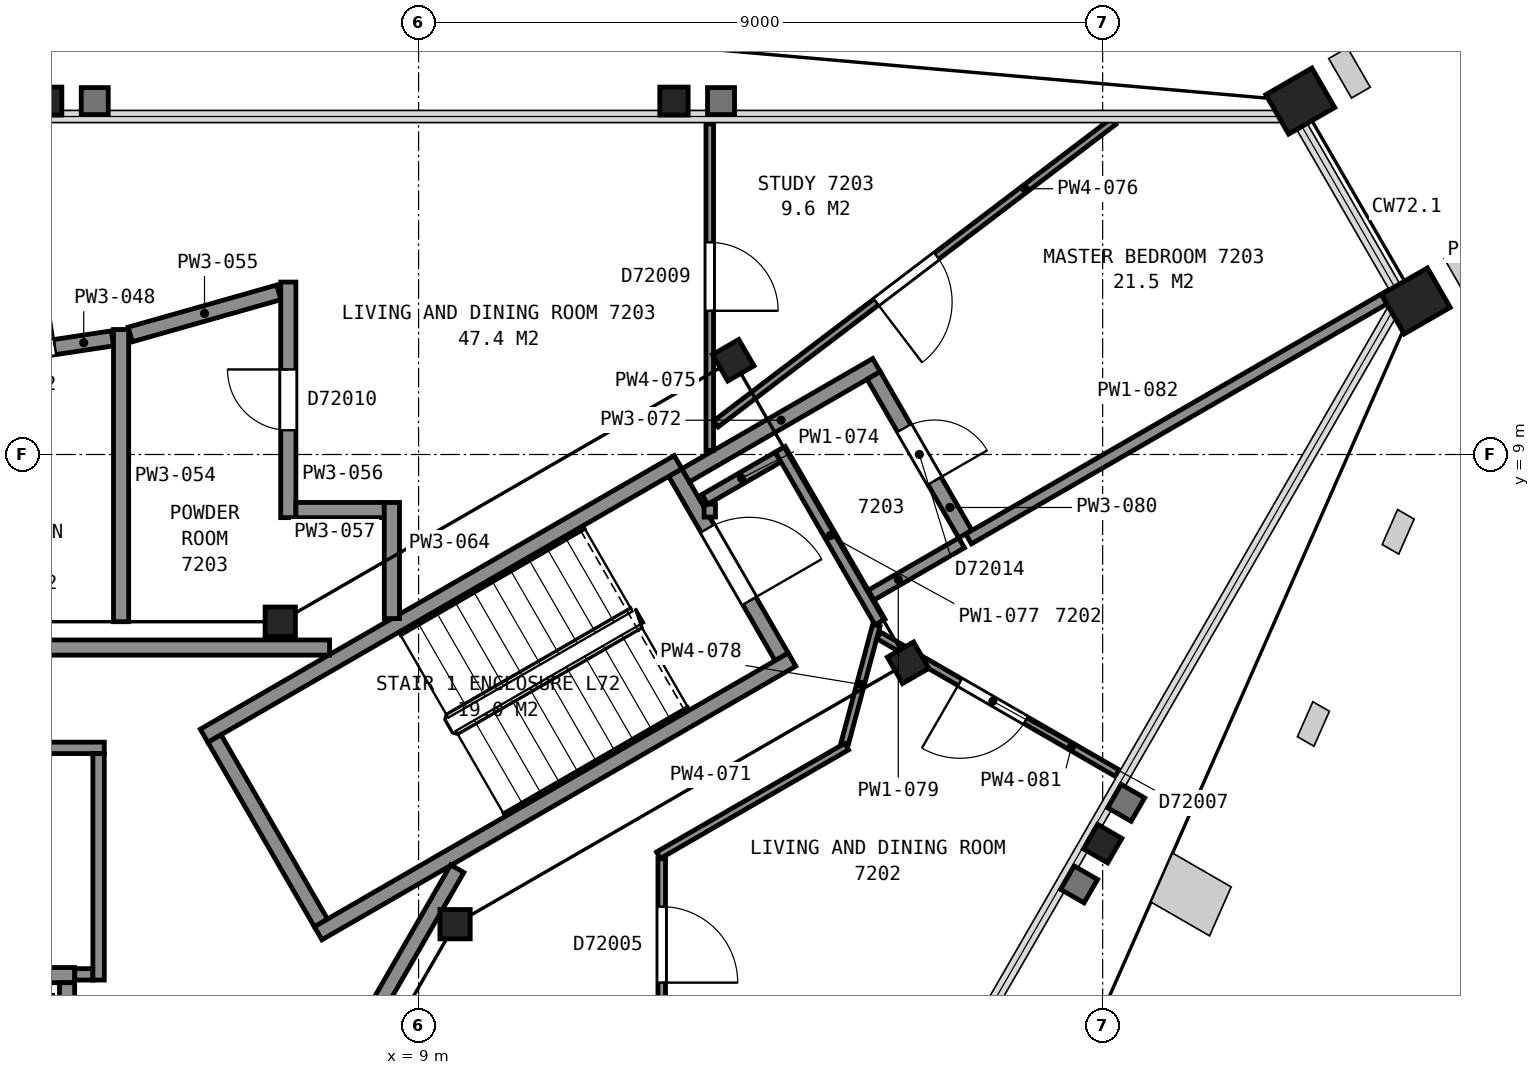
"""IFC4 building model, lengths in metres.
Left out: names, types, materials, properties, quantities, classifications, styles, units other than length and angle.
Written with IfcOpenShell. Run it as: python <this file> out.ifc"""

import sys

from ifc_helpers import new_model, si_unit, direction, frame, frame_2d, origin, origin_2d, place, context, subcontext, project, spatial, rectangle, hollow_rectangle, i_section, extrude, element, fill, save


model = new_model("IFC4")
c1 = context("Model", 3, precision=1e-05, world=origin(), true_north=direction((0.0, 1.0)))
c2 = subcontext(c1, "Body", "Model", "MODEL_VIEW")
j1 = project(units=[si_unit("LENGTHUNIT", "METRE"), si_unit("PLANEANGLEUNIT", "RADIAN")], contexts=[c1])
p1 = place(None, origin())
s1 = spatial("IfcSite", under=j1, at=p1, CompositionType="ELEMENT")
p2 = place(p1, origin())
s2 = spatial("IfcBuilding", under=s1, at=p2, CompositionType="ELEMENT")
p3 = place(p2, frame((0.0, 0.0, 286.2)))
s3 = spatial("IfcBuildingStorey", under=s2, at=p3, CompositionType="ELEMENT", Elevation=286.2)
p4 = place(p3, frame((20.6, 13.65, 0.0), z_axis=(0.0, 0.0, 1.0), x_axis=(0.5, -0.866025403784, 0.0)))
e1 = element("IfcColumn", 1, at=p4, inside=s3, PredefinedType="COLUMN", context=c2, shape_type="SweptSolid", body=[
    extrude(hollow_rectangle(XDim=0.6, YDim=0.7, WallThickness=0.04, at=origin_2d()), origin(), (0.0, 0.0, 1.0), 3.7),
])
for number, where, z_axis, x_axis in (
    (2, (12.36, 13.65, 0.0), (0.0, 0.0, 1.0), (1.0, 0.0, 0.0)),
    (3, (4.12, 13.65, 0.0), (0.0, 0.0, 1.0), (1.0, 0.0, 0.0)),
    (4, (18.0, 3.88, 0.0), (0.0, 0.0, 1.0), (-0.5, -0.866, 0.0)),
):
    element("IfcColumn", number, at=place(p3, frame(where, z_axis=z_axis, x_axis=x_axis)), inside=s3, PredefinedType="COLUMN", context=c2, shape_type="SweptSolid", body=[
        extrude(i_section(OverallWidth=0.373, OverallDepth=0.368, WebThickness=0.015, FlangeThickness=0.024, FilletRadius=0.015, at=origin_2d()), origin(), (0.0, 0.0, 1.0), 3.7),
    ])
p5 = place(p3, frame((22.12, 11.02, 0.0), z_axis=(0.0, 0.0, 1.0), x_axis=(0.5, -0.866025403784, 0.0)))
e5 = element("IfcColumn", 5, at=p5, inside=s3, PredefinedType="COLUMN", context=c2, shape_type="SweptSolid", body=[
    extrude(hollow_rectangle(XDim=0.6, YDim=0.7, WallThickness=0.04, at=origin_2d()), origin(), (0.0, 0.0, 1.0), 3.7),
])
p6 = place(p3, frame((9.48, 2.82, 0.0), z_axis=(0.0, 0.0, 1.0), x_axis=(1.0, 0.0, 0.0)))
e6 = element("IfcColumn", 6, at=p6, inside=s3, PredefinedType="COLUMN", context=c2, shape_type="SweptSolid", body=[
    extrude(i_section(OverallWidth=0.399, OverallDepth=0.386, WebThickness=0.021, FlangeThickness=0.033, FilletRadius=0.015, at=origin_2d()), origin(), (0.0, 0.0, 1.0), 3.7),
])
for number, where, z_axis, x_axis in (
    (7, (15.44, 6.26, 0.0), (0.0, 0.0, 1.0), (0.5, -0.866, 0.0)),
    (8, (13.14, 10.24, 0.0), (0.0, 0.0, 1.0), (0.5, -0.866, 0.0)),
):
    element("IfcColumn", number, at=place(p3, frame(where, z_axis=z_axis, x_axis=x_axis)), inside=s3, PredefinedType="COLUMN", context=c2, shape_type="SweptSolid", body=[
        extrude(i_section(OverallWidth=0.401, OverallDepth=0.399, WebThickness=0.025, FlangeThickness=0.04, FilletRadius=0.015, at=origin_2d()), origin(), (0.0, 0.0, 1.0), 3.7),
    ])
p7 = place(p3, frame((7.18, 6.8, 0.0), z_axis=(0.0, 0.0, 1.0), x_axis=(1.0, 0.0, 0.0)))
e9 = element("IfcColumn", 9, at=p7, inside=s3, PredefinedType="COLUMN", context=c2, shape_type="SweptSolid", body=[
    extrude(i_section(OverallWidth=0.399, OverallDepth=0.386, WebThickness=0.021, FlangeThickness=0.033, FilletRadius=0.015, at=origin_2d()), origin(), (0.0, 0.0, 1.0), 3.7),
])
p8 = place(p3, frame((13.777, 6.338, 0.0), z_axis=(0.0, 0.0, 1.0), x_axis=(-0.500049511043, 0.865996816683, 0.0)))
e10 = element("IfcWall", 10, at=p8, inside=s3, PredefinedType="PARTITIONING", context=c2, shape_type="SweptSolid", body=[
    extrude(rectangle(XDim=2.8, YDim=0.2, at=frame_2d((1.4, 0.0))), origin(), (0.0, 0.0, 1.0), 3.45),
])
p9 = place(p8, frame((0.85, 0.0, 0.0)))
e11 = element("IfcOpeningElement", 11, at=p9, cuts=e10, PredefinedType="OPENING", context=c2, shape_type="SweptSolid", body=[
    extrude(rectangle(XDim=1.1, YDim=2.1, at=frame_2d((0.55, 1.05))), frame((0.0, 0.11, 0.0), z_axis=(0.0, -1.0, 0.0), x_axis=(1.0, 0.0, 0.0)), (0.0, 0.0, 1.0), 0.22),
])
for number, where, z_axis, x_axis in (
    (12, (6.178, 5.299, 0.0), (0.0, 0.0, 1.0), (0.866, 0.5, 0.0)),
    (13, (7.678, 2.701, 0.0), (0.0, 0.0, 1.0), (0.866, 0.5, 0.0)),
):
    element("IfcWall", number, at=place(p3, frame(where, z_axis=z_axis, x_axis=x_axis)), inside=s3, PredefinedType="PARTITIONING", context=c2, shape_type="SweptSolid", body=[
        extrude(rectangle(XDim=7.2, YDim=0.2, at=frame_2d((3.6, 0.0))), origin(), (0.0, 0.0, 1.0), 3.45),
    ])
p10 = place(p3, frame((7.715, 2.838, 0.0), z_axis=(0.0, 0.0, 1.0), x_axis=(-0.500049511043, 0.865996816683, 0.0)))
e14 = element("IfcWall", 14, at=p10, inside=s3, PredefinedType="PARTITIONING", context=c2, shape_type="SweptSolid", body=[
    extrude(rectangle(XDim=2.8, YDim=0.2, at=frame_2d((1.4, 0.0))), origin(), (0.0, 0.0, 1.0), 3.45),
])
p11 = place(p3, frame((1.525, 2.15, 0.0), z_axis=(0.0, 0.0, 1.0), x_axis=(1.0, 0.0, 0.0)))
e15 = element("IfcWall", 15, at=p11, inside=s3, PredefinedType="PARTITIONING", context=c2, shape_type="SweptSolid", body=[
    extrude(rectangle(XDim=2.95, YDim=0.2, at=frame_2d((1.475, 0.0))), origin(), (0.0, 0.0, 1.0), 3.7),
])
p12 = place(p11, frame((0.925, 0.0, 0.0)))
e16 = element("IfcOpeningElement", 16, at=p12, cuts=e15, PredefinedType="OPENING", context=c2, shape_type="SweptSolid", body=[
    extrude(rectangle(XDim=1.1, YDim=2.1, at=frame_2d((0.55, 1.05))), frame((0.0, 0.11, 0.0), z_axis=(0.0, -1.0, 0.0), x_axis=(1.0, 0.0, 0.0)), (0.0, 0.0, 1.0), 0.22),
])
p13 = place(p3, frame((4.375, 0.1, 0.0), z_axis=(0.0, 0.0, 1.0), x_axis=(0.0, 1.0, 0.0)))
e17 = element("IfcWall", 17, at=p13, inside=s3, PredefinedType="PARTITIONING", context=c2, shape_type="SweptSolid", body=[
    extrude(rectangle(XDim=1.95, YDim=0.2, at=frame_2d((0.975, 0.0))), origin(), (0.0, 0.0, 1.0), 3.7),
])
p14 = place(p3, frame((7.829, 6.46, 0.0), z_axis=(0.0, 0.0, 1.0), x_axis=(-1.0, 0.0, 0.0)))
e18 = element("IfcWall", 18, at=p14, inside=s3, PredefinedType="PARTITIONING", context=c2, shape_type="SweptSolid", body=[
    extrude(rectangle(XDim=15.658, YDim=0.2, at=frame_2d((7.829, 0.0))), origin(), (0.0, 0.0, 1.0), 3.45),
])
p15 = place(p14, frame((12.168, 0.0, 0.0)))
e19 = element("IfcOpeningElement", 19, at=p15, cuts=e18, PredefinedType="OPENING", context=c2, shape_type="SweptSolid", body=[
    extrude(rectangle(XDim=1.2, YDim=2.1, at=frame_2d((0.6, 1.05))), frame((0.0, 0.11, 0.0), z_axis=(0.0, -1.0, 0.0), x_axis=(1.0, 0.0, 0.0)), (0.0, 0.0, 1.0), 0.22),
])
p16 = place(p3, frame((-0.245, 5.14, 0.0), z_axis=(0.0, 0.0, 1.0), x_axis=(1.0, 0.0, 0.0)))
e20 = element("IfcWall", 20, at=p16, inside=s3, PredefinedType="PARTITIONING", context=c2, shape_type="SweptSolid", body=[
    extrude(rectangle(XDim=5.11, YDim=0.15, at=frame_2d((2.555, 0.0))), origin(), (0.0, 0.0, 1.0), 3.45),
])
p17 = place(p16, frame((1.975, 0.0, 0.0)))
e21 = element("IfcOpeningElement", 21, at=p17, cuts=e20, PredefinedType="OPENING", context=c2, shape_type="SweptSolid", body=[
    extrude(rectangle(XDim=1.0, YDim=2.1, at=frame_2d((0.5, 1.05))), frame((0.0, 0.085, 0.0), z_axis=(0.0, -1.0, 0.0), x_axis=(1.0, 0.0, 0.0)), (0.0, 0.0, 1.0), 0.17),
])
p18 = place(p3, frame((3.828, -6.29, 0.0), z_axis=(0.0, 0.0, 1.0), x_axis=(0.499979739078, 0.866037101117, 0.0)))
e22 = element("IfcWall", 22, at=p18, inside=s3, PredefinedType="PARTITIONING", context=c2, shape_type="SweptSolid", body=[
    extrude(rectangle(XDim=11.363, YDim=0.2, at=frame_2d((5.681, 0.0))), origin(), (0.0, 0.0, 1.0), 3.45),
])
p19 = place(p18, frame((0.55, 0.0, 0.0)))
e23 = element("IfcOpeningElement", 23, at=p19, cuts=e22, PredefinedType="OPENING", context=c2, shape_type="SweptSolid", body=[
    extrude(rectangle(XDim=1.2, YDim=2.1, at=frame_2d((0.6, 1.05))), frame((0.0, 0.11, 0.0), z_axis=(0.0, -1.0, 0.0), x_axis=(1.0, 0.0, 0.0)), (0.0, 0.0, 1.0), 0.22),
])
p20 = place(p3, frame((4.477, 2.16, 0.0), z_axis=(0.0, 0.0, 1.0), x_axis=(1.0, 0.0, 0.0)))
e24 = element("IfcWall", 24, at=p20, inside=s3, PredefinedType="PARTITIONING", context=c2, shape_type="SweptSolid", body=[
    extrude(rectangle(XDim=0.238, YDim=0.15, at=frame_2d((0.119, 0.0))), origin(), (0.0, 0.0, 1.0), 3.45),
])
p21 = place(p3, frame((4.79, 2.085, 0.0), z_axis=(0.0, 0.0, 1.0), x_axis=(0.0, 1.0, 0.0)))
e25 = element("IfcWall", 25, at=p21, inside=s3, PredefinedType="PARTITIONING", context=c2, shape_type="SweptSolid", body=[
    extrude(rectangle(XDim=2.98, YDim=0.15, at=frame_2d((1.49, 0.0))), origin(), (0.0, 0.0, 1.0), 3.45),
])
p22 = place(p3, frame((4.972, 10.528, 0.0), z_axis=(0.0, 0.0, 1.0), x_axis=(-0.988827119235, -0.149066858374, 0.0)))
e26 = element("IfcWall", 26, at=p22, inside=s3, PredefinedType="PARTITIONING", context=c2, shape_type="SweptSolid", body=[
    extrude(rectangle(XDim=2.399, YDim=0.2, at=frame_2d((1.2, 0.0))), origin(), (0.0, 0.0, 1.0), 2.723),
])
p23 = place(p22, frame((0.764, 0.0, 0.0)))
e27 = element("IfcOpeningElement", 27, at=p23, cuts=e26, PredefinedType="OPENING", context=c2, shape_type="SweptSolid", body=[
    extrude(rectangle(XDim=0.9, YDim=2.1, at=frame_2d((0.45, 1.05))), frame((0.0, 0.11, 0.0), z_axis=(0.0, -1.0, 0.0), x_axis=(1.0, 0.0, 0.0)), (0.0, 0.0, 1.0), 0.22),
])
p24 = place(p3, frame((5.086, 6.8, 0.0), z_axis=(0.0, 0.0, 1.0), x_axis=(0.0, 1.0, 0.0)))
e28 = element("IfcWall", 28, at=p24, inside=s3, PredefinedType="PARTITIONING", context=c2, shape_type="SweptSolid", body=[
    extrude(rectangle(XDim=3.845, YDim=0.2, at=frame_2d((1.922, 0.0))), origin(), (0.0, 0.0, 1.0), 2.723),
])
p25 = place(p3, frame((5.206, 10.579, 0.0), z_axis=(0.0, 0.0, 1.0), x_axis=(0.962043687615, 0.272895480212, 0.0)))
e29 = element("IfcWall", 29, at=p25, inside=s3, PredefinedType="PARTITIONING", context=c2, shape_type="SweptSolid", body=[
    extrude(rectangle(XDim=2.032, YDim=0.2, at=frame_2d((1.016, 0.0))), origin(), (0.0, 0.0, 1.0), 2.723),
])
p26 = place(p3, frame((7.286, 8.169, 0.0), z_axis=(0.0, 0.0, 1.0), x_axis=(0.0, 1.0, 0.0)))
e30 = element("IfcWall", 30, at=p26, inside=s3, PredefinedType="PARTITIONING", context=c2, shape_type="SweptSolid", body=[
    extrude(rectangle(XDim=3.1, YDim=0.2, at=frame_2d((1.55, 0.0))), origin(), (0.0, 0.0, 1.0), 2.723),
])
p27 = place(p26, frame((1.15, 0.0, 0.0)))
e31 = element("IfcOpeningElement", 31, at=p27, cuts=e30, PredefinedType="OPENING", context=c2, shape_type="SweptSolid", body=[
    extrude(rectangle(XDim=0.8, YDim=2.1, at=frame_2d((0.4, 1.05))), frame((0.0, 0.11, 0.0), z_axis=(0.0, -1.0, 0.0), x_axis=(1.0, 0.0, 0.0)), (0.0, 0.0, 1.0), 0.22),
])
p28 = place(p3, frame((7.386, 8.269, 0.0), z_axis=(0.0, 0.0, 1.0), x_axis=(1.0, 0.0, 0.0)))
e32 = element("IfcWall", 32, at=p28, inside=s3, PredefinedType="PARTITIONING", context=c2, shape_type="SweptSolid", body=[
    extrude(rectangle(XDim=1.163, YDim=0.2, at=frame_2d((0.582, 0.0))), origin(), (0.0, 0.0, 1.0), 2.723),
])
p29 = place(p3, frame((8.649, 6.841, 0.0), z_axis=(0.0, 0.0, 1.0), x_axis=(0.0, 1.0, 0.0)))
e33 = element("IfcWall", 33, at=p29, inside=s3, PredefinedType="PARTITIONING", context=c2, shape_type="SweptSolid", body=[
    extrude(rectangle(XDim=1.528, YDim=0.2, at=frame_2d((0.764, 0.0))), origin(), (0.0, 0.0, 1.0), 2.723),
])
p30 = place(p3, frame((12.199, 3.682, 0.0), z_axis=(0.0, 0.0, 1.0), x_axis=(0.0, -1.0, 0.0)))
e34 = element("IfcWall", 34, at=p30, inside=s3, PredefinedType="PARTITIONING", context=c2, shape_type="SweptSolid", body=[
    extrude(rectangle(XDim=2.381, YDim=0.1, at=frame_2d((1.19, 0.0))), origin(), (0.0, 0.0, 1.0), 2.723),
])
p31 = place(p30, frame((0.631, 0.0, 0.0)))
e35 = element("IfcOpeningElement", 35, at=p31, cuts=e34, PredefinedType="OPENING", context=c2, shape_type="SweptSolid", body=[
    extrude(rectangle(XDim=1.0, YDim=2.1, at=frame_2d((0.5, 1.05))), frame((0.0, 0.06, 0.0), z_axis=(0.0, -1.0, 0.0), x_axis=(1.0, 0.0, 0.0)), (0.0, 0.0, 1.0), 0.12),
])
p32 = place(p3, frame((12.156, 3.727, 0.0), z_axis=(0.0, 0.0, 1.0), x_axis=(0.866012137121, 0.500022977831, 0.0)))
e36 = element("IfcWall", 36, at=p32, inside=s3, PredefinedType="PARTITIONING", context=c2, shape_type="SweptSolid", body=[
    extrude(rectangle(XDim=2.86, YDim=0.1, at=frame_2d((1.43, 0.0))), origin(), (0.0, 0.0, 1.0), 2.723),
])
p33 = place(p3, frame((12.514, 8.726, 0.0), z_axis=(0.0, 0.0, 1.0), x_axis=(0.865969617579, 0.500096612097, 0.0)))
e37 = element("IfcWall", 37, at=p33, inside=s3, PredefinedType="PARTITIONING", context=c2, shape_type="SweptSolid", body=[
    extrude(rectangle(XDim=2.899, YDim=0.2, at=frame_2d((1.45, 0.0))), origin(), (0.0, 0.0, 1.0), 2.723),
])
p34 = place(p3, frame((12.831, 8.177, 0.0), z_axis=(0.0, 0.0, 1.0), x_axis=(0.0, 1.0, 0.0)))
e38 = element("IfcWall", 38, at=p34, inside=s3, PredefinedType="PARTITIONING", context=c2, shape_type="SweptSolid", body=[
    extrude(rectangle(XDim=0.17, YDim=0.15, at=frame_2d((0.085, 0.0))), origin(), (0.0, 0.0, 1.0), 2.723),
])
p35 = place(p3, frame((12.766, 8.409, 0.0), z_axis=(0.0, 0.0, 1.0), x_axis=(0.865995823051, 0.500051231833, 0.0)))
e39 = element("IfcWall", 39, at=p35, inside=s3, PredefinedType="PARTITIONING", context=c2, shape_type="SweptSolid", body=[
    extrude(rectangle(XDim=1.114, YDim=0.15, at=frame_2d((0.557, 0.0))), origin(), (0.0, 0.0, 1.0), 2.723),
])
p36 = place(p3, frame((12.831, 13.351, 0.0), z_axis=(0.0, 0.0, 1.0), x_axis=(0.0, -1.0, 0.0)))
e40 = element("IfcWall", 40, at=p36, inside=s3, PredefinedType="PARTITIONING", context=c2, shape_type="SweptSolid", body=[
    extrude(rectangle(XDim=4.298, YDim=0.1, at=frame_2d((2.149, 0.0))), origin(), (0.0, 0.0, 1.0), 2.723),
])
p37 = place(p36, frame((1.56, 0.0, 0.0)))
e41 = element("IfcOpeningElement", 41, at=p37, cuts=e40, PredefinedType="OPENING", context=c2, shape_type="SweptSolid", body=[
    extrude(rectangle(XDim=0.9, YDim=2.1, at=frame_2d((0.45, 1.05))), frame((0.0, 0.06, 0.0), z_axis=(0.0, -1.0, 0.0), x_axis=(1.0, 0.0, 0.0)), (0.0, 0.0, 1.0), 0.12),
])
p38 = place(p3, frame((18.144, 13.383, 0.0), z_axis=(0.0, 0.0, 1.0), x_axis=(-0.795867985115, -0.605470189414, 0.0)))
e42 = element("IfcWall", 42, at=p38, inside=s3, PredefinedType="PARTITIONING", context=c2, shape_type="SweptSolid", body=[
    extrude(rectangle(XDim=6.574, YDim=0.1, at=frame_2d((3.287, 0.0))), origin(), (0.0, 0.0, 1.0), 2.723),
])
p39 = place(p38, frame((2.925, 0.0, 0.0)))
e43 = element("IfcOpeningElement", 43, at=p39, cuts=e42, PredefinedType="OPENING", context=c2, shape_type="SweptSolid", body=[
    extrude(rectangle(XDim=1.0, YDim=2.1, at=frame_2d((0.5, 1.05))), frame((0.0, 0.06, 0.0), z_axis=(0.0, -1.0, 0.0), x_axis=(1.0, 0.0, 0.0)), (0.0, 0.0, 1.0), 0.12),
])
p40 = place(p3, frame((13.759, 9.069, 0.0), z_axis=(0.0, 0.0, 1.0), x_axis=(0.500020344131, -0.866013657776, 0.0)))
e44 = element("IfcWall", 44, at=p40, inside=s3, PredefinedType="PARTITIONING", context=c2, shape_type="SweptSolid", body=[
    extrude(rectangle(XDim=2.625, YDim=0.15, at=frame_2d((1.312, 0.0))), origin(), (0.0, 0.0, 1.0), 2.723),
])
p41 = place(p3, frame((14.607, 5.2, 0.0), z_axis=(0.0, 0.0, 1.0), x_axis=(0.258589257768, 0.965987368327, 0.0)))
e45 = element("IfcWall", 45, at=p41, inside=s3, PredefinedType="PARTITIONING", context=c2, shape_type="SweptSolid", body=[
    extrude(rectangle(XDim=1.607, YDim=0.1, at=frame_2d((0.803, 0.0))), origin(), (0.0, 0.0, 1.0), 2.723),
])
p42 = place(p3, frame((14.954, 7.149, 0.0), z_axis=(0.0, 0.0, 1.0), x_axis=(0.865960792519, 0.5001118933, 0.0)))
e46 = element("IfcWall", 46, at=p42, inside=s3, PredefinedType="PARTITIONING", context=c2, shape_type="SweptSolid", body=[
    extrude(rectangle(XDim=1.375, YDim=0.15, at=frame_2d((0.688, 0.0))), origin(), (0.0, 0.0, 1.0), 2.723),
])
p43 = place(p3, frame((16.194, 7.952, 0.0), z_axis=(0.0, 0.0, 1.0), x_axis=(-0.500125724882, 0.865952804321, 0.0)))
e47 = element("IfcWall", 47, at=p43, inside=s3, PredefinedType="PARTITIONING", context=c2, shape_type="SweptSolid", body=[
    extrude(rectangle(XDim=2.411, YDim=0.2, at=frame_2d((1.205, 0.0))), origin(), (0.0, 0.0, 1.0), 2.723),
])
p44 = place(p43, frame((0.811, 0.0, 0.0)))
e48 = element("IfcOpeningElement", 48, at=p44, cuts=e47, PredefinedType="OPENING", context=c2, shape_type="SweptSolid", body=[
    extrude(rectangle(XDim=0.8, YDim=2.1, at=frame_2d((0.4, 1.05))), frame((0.0, 0.11, 0.0), z_axis=(0.0, -1.0, 0.0), x_axis=(1.0, 0.0, 0.0)), (0.0, 0.0, 1.0), 0.22),
])
p45 = place(p3, frame((15.052, 6.62, 0.0), z_axis=(0.0, 0.0, 1.0), x_axis=(0.866029693906, -0.499992569217, 0.0)))
e49 = element("IfcWall", 49, at=p45, inside=s3, PredefinedType="PARTITIONING", context=c2, shape_type="SweptSolid", body=[
    extrude(rectangle(XDim=3.625, YDim=0.1, at=frame_2d((1.812, 0.0))), origin(), (0.0, 0.0, 1.0), 2.723),
])
p46 = place(p45, frame((1.235, 0.0, 0.0)))
e50 = element("IfcOpeningElement", 50, at=p46, cuts=e49, PredefinedType="OPENING", context=c2, shape_type="SweptSolid", body=[
    extrude(rectangle(XDim=1.0, YDim=2.1, at=frame_2d((0.5, 1.05))), frame((0.0, 0.06, 0.0), z_axis=(0.0, -1.0, 0.0), x_axis=(1.0, 0.0, 0.0)), (0.0, 0.0, 1.0), 0.12),
])
p47 = place(p3, frame((16.236, 7.889, 0.0), z_axis=(0.0, 0.0, 1.0), x_axis=(0.865995456094, 0.500051867335, 0.0)))
e51 = element("IfcWall", 51, at=p47, inside=s3, PredefinedType="PARTITIONING", context=c2, shape_type="SweptSolid", body=[
    extrude(rectangle(XDim=6.415, YDim=0.15, at=frame_2d((3.208, 0.0))), origin(), (0.0, 0.0, 1.0), 2.723),
])
p48 = place(p9, origin())
e52 = element("IfcDoor", 52, at=p48, inside=s3, OperationType="SINGLE_SWING_LEFT", PredefinedType="DOOR", context=c2, shape_type="SweptSolid", body=[
    extrude(rectangle(XDim=1.1, YDim=2.1, at=frame_2d((0.55, 1.05))), frame((0.0, 0.025, 0.0), z_axis=(0.0, -1.0, 0.0), x_axis=(1.0, 0.0, 0.0)), (0.0, 0.0, 1.0), 0.05),
])
fill(e11, e52)
p49 = place(p23, origin())
e53 = element("IfcDoor", 53, at=p49, inside=s3, OperationType="SINGLE_SWING_LEFT", PredefinedType="DOOR", context=c2, shape_type="SweptSolid", body=[
    extrude(rectangle(XDim=0.9, YDim=2.1, at=frame_2d((0.45, 1.05))), frame((0.0, 0.025, 0.0), z_axis=(0.0, -1.0, 0.0), x_axis=(1.0, 0.0, 0.0)), (0.0, 0.0, 1.0), 0.05),
])
fill(e27, e53)
p50 = place(p27, origin())
e54 = element("IfcDoor", 54, at=p50, inside=s3, OperationType="SINGLE_SWING_RIGHT", PredefinedType="DOOR", context=c2, shape_type="SweptSolid", body=[
    extrude(rectangle(XDim=0.8, YDim=2.1, at=frame_2d((0.4, 1.05))), frame((0.0, 0.025, 0.0), z_axis=(0.0, -1.0, 0.0), x_axis=(1.0, 0.0, 0.0)), (0.0, 0.0, 1.0), 0.05),
])
fill(e31, e54)
p51 = place(p31, origin())
e55 = element("IfcDoor", 55, at=p51, inside=s3, OperationType="SINGLE_SWING_RIGHT", PredefinedType="DOOR", context=c2, shape_type="SweptSolid", body=[
    extrude(rectangle(XDim=1.0, YDim=2.1, at=frame_2d((0.5, 1.05))), frame((0.0, 0.025, 0.0), z_axis=(0.0, -1.0, 0.0), x_axis=(1.0, 0.0, 0.0)), (0.0, 0.0, 1.0), 0.05),
])
fill(e35, e55)
p52 = place(p37, origin())
e56 = element("IfcDoor", 56, at=p52, inside=s3, OperationType="SINGLE_SWING_RIGHT", PredefinedType="DOOR", context=c2, shape_type="SweptSolid", body=[
    extrude(rectangle(XDim=0.9, YDim=2.1, at=frame_2d((0.45, 1.05))), frame((0.0, 0.025, 0.0), z_axis=(0.0, -1.0, 0.0), x_axis=(1.0, 0.0, 0.0)), (0.0, 0.0, 1.0), 0.05),
])
fill(e41, e56)
p53 = place(p39, origin())
e57 = element("IfcDoor", 57, at=p53, inside=s3, OperationType="SINGLE_SWING_RIGHT", PredefinedType="DOOR", context=c2, shape_type="SweptSolid", body=[
    extrude(rectangle(XDim=1.0, YDim=2.1, at=frame_2d((0.5, 1.05))), frame((0.0, 0.025, 0.0), z_axis=(0.0, -1.0, 0.0), x_axis=(1.0, 0.0, 0.0)), (0.0, 0.0, 1.0), 0.05),
])
fill(e43, e57)
p54 = place(p44, origin())
e58 = element("IfcDoor", 58, at=p54, inside=s3, OperationType="SINGLE_SWING_LEFT", PredefinedType="DOOR", context=c2, shape_type="SweptSolid", body=[
    extrude(rectangle(XDim=0.8, YDim=2.1, at=frame_2d((0.4, 1.05))), frame((0.0, 0.025, 0.0), z_axis=(0.0, -1.0, 0.0), x_axis=(1.0, 0.0, 0.0)), (0.0, 0.0, 1.0), 0.05),
])
fill(e48, e58)
p55 = place(p46, origin())
e59 = element("IfcDoor", 59, at=p55, inside=s3, OperationType="SINGLE_SWING_LEFT", PredefinedType="DOOR", context=c2, shape_type="SweptSolid", body=[
    extrude(rectangle(XDim=1.0, YDim=2.1, at=frame_2d((0.5, 1.05))), frame((0.0, 0.025, 0.0), z_axis=(0.0, -1.0, 0.0), x_axis=(1.0, 0.0, 0.0)), (0.0, 0.0, 1.0), 0.05),
])
fill(e50, e59)
save(model, sys.argv[1])
